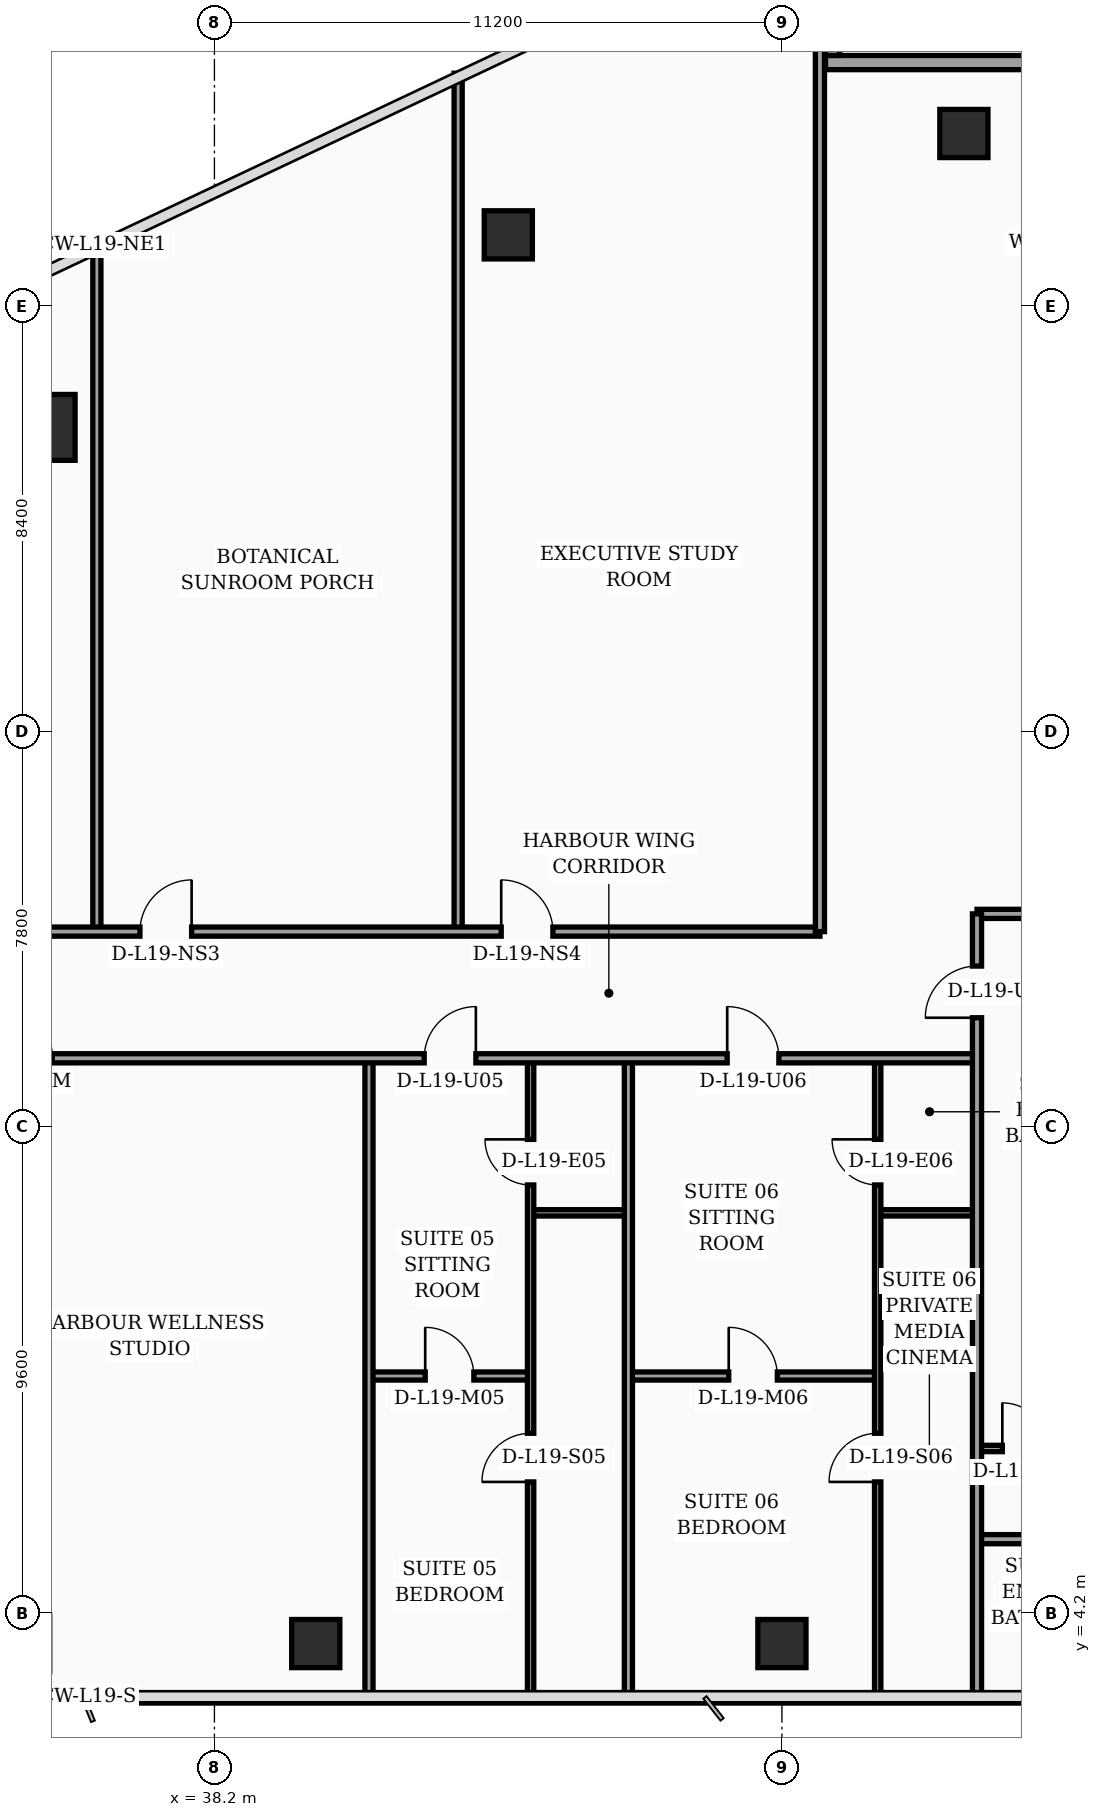
"""IFC4 building model, lengths in metres.
Left out: names, types, materials, properties, quantities, classifications, styles, units other than length and angle.
Written with IfcOpenShell. Run it as: python <this file> out.ifc"""

import sys

from ifc_helpers import new_model, si_unit, direction, frame, frame_2d, origin, origin_2d, place, context, subcontext, project, spatial, rectangle, hollow_rectangle, circle, extrude, element, fill, save


model = new_model("IFC4")
c1 = context("Model", 3, precision=1e-05, world=origin(), true_north=direction((0.0, 1.0)))
c2 = subcontext(c1, "Body", "Model", "MODEL_VIEW")
j1 = project(units=[si_unit("LENGTHUNIT", "METRE"), si_unit("PLANEANGLEUNIT", "RADIAN")], contexts=[c1])
p1 = place(None, origin())
s1 = spatial("IfcSite", under=j1, at=p1, CompositionType="ELEMENT")
p2 = place(p1, origin())
s2 = spatial("IfcBuilding", under=s1, at=p2, CompositionType="ELEMENT")
p3 = place(p2, frame((0.0, 0.0, 81.2)))
s3 = spatial("IfcBuildingStorey", under=s2, at=p3, CompositionType="ELEMENT", Elevation=81.2)
for number, where, z_axis, x_axis in (
    (1, (40.2, 3.6, 0.0), (0.0, 0.0, 1.0), (1.0, 0.0, 0.0)),
    (2, (49.4, 3.6, 0.0), (0.0, 0.0, 1.0), (1.0, 0.0, 0.0)),
):
    element("IfcColumn", number, at=place(p3, frame(where, z_axis=z_axis, x_axis=x_axis)), inside=s3, PredefinedType="COLUMN", context=c2, shape_type="SweptSolid", body=[
        extrude(hollow_rectangle(XDim=0.95, YDim=0.95, WallThickness=0.04, at=origin_2d()), origin(), (0.0, 0.0, 1.0), 3.56),
    ])
p4 = place(p3, frame((34.8, 27.6, 0.0), z_axis=(0.0, 0.0, 1.0), x_axis=(1.0, 0.0, 0.0)))
e3 = element("IfcColumn", 3, at=p4, inside=s3, PredefinedType="COLUMN", context=c2, shape_type="SweptSolid", body=[
    extrude(circle(Radius=0.65, at=origin_2d()), origin(), (0.0, 0.0, 1.0), 3.56),
])
for number, where, z_axis, x_axis in (
    (4, (44.0, 31.4, 0.0), (0.0, 0.0, 1.0), (1.0, 0.0, 0.0)),
    (5, (52.991, 33.4, 0.0), (0.0, 0.0, 1.0), (1.0, 0.0, 0.0)),
):
    element("IfcColumn", number, at=place(p3, frame(where, z_axis=z_axis, x_axis=x_axis)), inside=s3, PredefinedType="COLUMN", context=c2, shape_type="SweptSolid", body=[
        extrude(hollow_rectangle(XDim=0.95, YDim=0.95, WallThickness=0.04, at=origin_2d()), origin(), (0.0, 0.0, 1.0), 3.56),
    ])
p5 = place(p3, frame((54.44, 34.8, 0.0), z_axis=(0.0, 0.0, 1.0), x_axis=(-1.0, 0.0, 0.0)))
e6 = element("IfcWall", 6, at=p5, inside=s3, PredefinedType="SOLIDWALL", context=c2, shape_type="SweptSolid", body=[
    extrude(rectangle(XDim=4.18, YDim=0.28, at=frame_2d((2.09, 0.0))), origin(), (0.0, 0.0, 1.0), 3.56),
])
p6 = place(p3, frame((50.4, 34.94, 0.0), z_axis=(0.0, 0.0, 1.0), x_axis=(0.0, 1.0, 0.0)))
e7 = element("IfcWall", 7, at=p6, inside=s3, PredefinedType="SOLIDWALL", context=c2, shape_type="SweptSolid", body=[
    extrude(rectangle(XDim=3.1, YDim=0.28, at=frame_2d((1.55, 0.0))), origin(), (0.0, 0.0, 1.0), 3.56),
])
p7 = place(p3, frame((44.44, 12.1, 0.0), z_axis=(0.0, 0.0, 1.0), x_axis=(1.0, 0.0, 0.0)))
e8 = element("IfcWall", 8, at=p7, inside=s3, PredefinedType="PARTITIONING", context=c2, shape_type="SweptSolid", body=[
    extrude(rectangle(XDim=1.93, YDim=0.125, at=frame_2d((0.965, 0.0))), origin(), (0.0, 0.0, 1.0), 3.56),
])
p8 = place(p3, frame((41.25, 8.88, 0.0), z_axis=(0.0, 0.0, 1.0), x_axis=(1.0, 0.0, 0.0)))
e9 = element("IfcWall", 9, at=p8, inside=s3, PredefinedType="PARTITIONING", context=c2, shape_type="SweptSolid", body=[
    extrude(rectangle(XDim=3.19, YDim=0.16, at=frame_2d((1.595, 0.0))), origin(), (0.0, 0.0, 1.0), 3.56),
])
p9 = place(p8, frame((1.11, 0.0, 0.0)))
e10 = element("IfcOpeningElement", 10, at=p9, cuts=e9, PredefinedType="OPENING", context=c2, shape_type="SweptSolid", body=[
    extrude(rectangle(XDim=0.96, YDim=2.2, at=frame_2d((0.48, 1.1))), frame((0.0, 0.09, 0.0), z_axis=(0.0, -1.0, 0.0), x_axis=(1.0, 0.0, 0.0)), (0.0, 0.0, 1.0), 0.18),
])
p10 = place(p3, frame((44.44, 2.44, 0.0), z_axis=(0.0, 0.0, 1.0), x_axis=(0.0, 1.0, 0.0)))
e11 = element("IfcWall", 11, at=p10, inside=s3, PredefinedType="PARTITIONING", context=c2, shape_type="SweptSolid", body=[
    extrude(rectangle(XDim=12.71, YDim=0.125, at=frame_2d((6.355, 0.0))), origin(), (0.0, 0.0, 1.0), 3.04),
])
p11 = place(p10, frame((4.35, 0.0, 0.0)))
e12 = element("IfcOpeningElement", 12, at=p11, cuts=e11, PredefinedType="OPENING", context=c2, shape_type="SweptSolid", body=[
    extrude(rectangle(XDim=0.96, YDim=2.2, at=frame_2d((0.48, 1.1))), frame((0.0, 0.073, 0.0), z_axis=(0.0, -1.0, 0.0), x_axis=(1.0, 0.0, 0.0)), (0.0, 0.0, 1.0), 0.145),
])
p12 = place(p10, frame((10.21, 0.0, 0.0)))
e13 = element("IfcOpeningElement", 13, at=p12, cuts=e11, PredefinedType="OPENING", context=c2, shape_type="SweptSolid", body=[
    extrude(rectangle(XDim=0.9, YDim=2.15, at=frame_2d((0.45, 1.075))), frame((0.0, 0.073, 0.0), z_axis=(0.0, -1.0, 0.0), x_axis=(1.0, 0.0, 0.0)), (0.0, 0.0, 1.0), 0.145),
])
p13 = place(p3, frame((41.25, 2.44, 0.0), z_axis=(0.0, 0.0, 1.0), x_axis=(0.0, 1.0, 0.0)))
e14 = element("IfcWall", 14, at=p13, inside=s3, PredefinedType="PARTITIONING", context=c2, shape_type="SweptSolid", body=[
    extrude(rectangle(XDim=12.71, YDim=0.16, at=frame_2d((6.355, 0.0))), origin(), (0.0, 0.0, 1.0), 3.04),
])
p14 = place(p3, frame((51.29, 12.1, 0.0), z_axis=(0.0, 0.0, 1.0), x_axis=(1.0, 0.0, 0.0)))
e15 = element("IfcWall", 15, at=p14, inside=s3, PredefinedType="PARTITIONING", context=c2, shape_type="SweptSolid", body=[
    extrude(rectangle(XDim=1.96, YDim=0.125, at=frame_2d((0.98, 0.0))), origin(), (0.0, 0.0, 1.0), 3.56),
])
p15 = place(p3, frame((46.37, 8.88, 0.0), z_axis=(0.0, 0.0, 1.0), x_axis=(1.0, 0.0, 0.0)))
e16 = element("IfcWall", 16, at=p15, inside=s3, PredefinedType="PARTITIONING", context=c2, shape_type="SweptSolid", body=[
    extrude(rectangle(XDim=4.92, YDim=0.16, at=frame_2d((2.46, 0.0))), origin(), (0.0, 0.0, 1.0), 2.84),
])
p16 = place(p15, frame((1.98, 0.0, 0.0)))
e17 = element("IfcOpeningElement", 17, at=p16, cuts=e16, PredefinedType="OPENING", context=c2, shape_type="SweptSolid", body=[
    extrude(rectangle(XDim=0.96, YDim=2.2, at=frame_2d((0.48, 1.1))), frame((0.0, 0.09, 0.0), z_axis=(0.0, -1.0, 0.0), x_axis=(1.0, 0.0, 0.0)), (0.0, 0.0, 1.0), 0.18),
])
p17 = place(p3, frame((51.29, 2.44, 0.0), z_axis=(0.0, 0.0, 1.0), x_axis=(0.0, 1.0, 0.0)))
e18 = element("IfcWall", 18, at=p17, inside=s3, PredefinedType="PARTITIONING", context=c2, shape_type="SweptSolid", body=[
    extrude(rectangle(XDim=12.71, YDim=0.125, at=frame_2d((6.355, 0.0))), origin(), (0.0, 0.0, 1.0), 3.04),
])
p18 = place(p17, frame((4.35, 0.0, 0.0)))
e19 = element("IfcOpeningElement", 19, at=p18, cuts=e18, PredefinedType="OPENING", context=c2, shape_type="SweptSolid", body=[
    extrude(rectangle(XDim=0.96, YDim=2.2, at=frame_2d((0.48, 1.1))), frame((0.0, 0.073, 0.0), z_axis=(0.0, -1.0, 0.0), x_axis=(1.0, 0.0, 0.0)), (0.0, 0.0, 1.0), 0.145),
])
p19 = place(p17, frame((10.21, 0.0, 0.0)))
e20 = element("IfcOpeningElement", 20, at=p19, cuts=e18, PredefinedType="OPENING", context=c2, shape_type="SweptSolid", body=[
    extrude(rectangle(XDim=0.9, YDim=2.15, at=frame_2d((0.45, 1.075))), frame((0.0, 0.073, 0.0), z_axis=(0.0, -1.0, 0.0), x_axis=(1.0, 0.0, 0.0)), (0.0, 0.0, 1.0), 0.145),
])
p20 = place(p3, frame((46.37, 2.44, 0.0), z_axis=(0.0, 0.0, 1.0), x_axis=(0.0, 1.0, 0.0)))
e21 = element("IfcWall", 21, at=p20, inside=s3, PredefinedType="PARTITIONING", context=c2, shape_type="SweptSolid", body=[
    extrude(rectangle(XDim=12.71, YDim=0.16, at=frame_2d((6.355, 0.0))), origin(), (0.0, 0.0, 1.0), 3.04),
])
p21 = place(p3, frame((32.4, 15.15, 0.0), z_axis=(0.0, 0.0, 1.0), x_axis=(1.0, 0.0, 0.0)))
e22 = element("IfcWall", 22, at=p21, inside=s3, PredefinedType="PARTITIONING", context=c2, shape_type="SweptSolid", body=[
    extrude(rectangle(XDim=20.85, YDim=0.18, at=frame_2d((10.425, 0.0))), origin(), (0.0, 0.0, 1.0), 2.84),
])
p22 = place(p21, frame((1.1, 0.0, 0.0)))
e23 = element("IfcOpeningElement", 23, at=p22, cuts=e22, PredefinedType="OPENING", context=c2, shape_type="SweptSolid", body=[
    extrude(rectangle(XDim=1.5, YDim=2.22, at=frame_2d((0.75, 1.11))), frame((0.0, 0.1, 0.0), z_axis=(0.0, -1.0, 0.0), x_axis=(1.0, 0.0, 0.0)), (0.0, 0.0, 1.0), 0.2),
])
p23 = place(p21, frame((9.94, 0.0, 0.0)))
e24 = element("IfcOpeningElement", 24, at=p23, cuts=e22, PredefinedType="OPENING", context=c2, shape_type="SweptSolid", body=[
    extrude(rectangle(XDim=1.02, YDim=2.2, at=frame_2d((0.51, 1.1))), frame((0.0, 0.1, 0.0), z_axis=(0.0, -1.0, 0.0), x_axis=(1.0, 0.0, 0.0)), (0.0, 0.0, 1.0), 0.2),
])
p24 = place(p21, frame((15.92, 0.0, 0.0)))
e25 = element("IfcOpeningElement", 25, at=p24, cuts=e22, PredefinedType="OPENING", context=c2, shape_type="SweptSolid", body=[
    extrude(rectangle(XDim=1.02, YDim=2.2, at=frame_2d((0.51, 1.1))), frame((0.0, 0.1, 0.0), z_axis=(0.0, -1.0, 0.0), x_axis=(1.0, 0.0, 0.0)), (0.0, 0.0, 1.0), 0.2),
])
p25 = place(p3, frame((35.88, 17.65, 0.0), z_axis=(0.0, 0.0, 1.0), x_axis=(0.0, 1.0, 0.0)))
e26 = element("IfcWall", 26, at=p25, inside=s3, PredefinedType="PARTITIONING", context=c2, shape_type="SweptSolid", body=[
    extrude(rectangle(XDim=13.57, YDim=0.16, at=frame_2d((6.785, 0.0))), origin(), (0.0, 0.0, 1.0), 2.84),
])
p26 = place(p3, frame((43.01, 17.65, 0.0), z_axis=(0.0, 0.0, 1.0), x_axis=(0.0, 1.0, 0.0)))
e27 = element("IfcWall", 27, at=p26, inside=s3, PredefinedType="PARTITIONING", context=c2, shape_type="SweptSolid", body=[
    extrude(rectangle(XDim=16.94, YDim=0.16, at=frame_2d((8.47, 0.0))), origin(), (0.0, 0.0, 1.0), 2.84),
])
p27 = place(p3, frame((21.5, 17.65, 0.0), z_axis=(0.0, 0.0, 1.0), x_axis=(1.0, 0.0, 0.0)))
e28 = element("IfcWall", 28, at=p27, inside=s3, PredefinedType="PARTITIONING", context=c2, shape_type="SweptSolid", body=[
    extrude(rectangle(XDim=28.65, YDim=0.18, at=frame_2d((14.325, 0.0))), origin(), (0.0, 0.0, 1.0), 2.84),
])
p28 = place(p27, frame((0.95, 0.0, 0.0)))
e29 = element("IfcOpeningElement", 29, at=p28, cuts=e28, PredefinedType="OPENING", context=c2, shape_type="SweptSolid", body=[
    extrude(rectangle(XDim=1.02, YDim=2.2, at=frame_2d((0.51, 1.1))), frame((0.0, 0.1, 0.0), z_axis=(0.0, -1.0, 0.0), x_axis=(1.0, 0.0, 0.0)), (0.0, 0.0, 1.0), 0.2),
])
p29 = place(p27, frame((8.74, 0.0, 0.0)))
e30 = element("IfcOpeningElement", 30, at=p29, cuts=e28, PredefinedType="OPENING", context=c2, shape_type="SweptSolid", body=[
    extrude(rectangle(XDim=1.02, YDim=2.2, at=frame_2d((0.51, 1.1))), frame((0.0, 0.1, 0.0), z_axis=(0.0, -1.0, 0.0), x_axis=(1.0, 0.0, 0.0)), (0.0, 0.0, 1.0), 0.2),
])
p30 = place(p27, frame((15.23, 0.0, 0.0)))
e31 = element("IfcOpeningElement", 31, at=p30, cuts=e28, PredefinedType="OPENING", context=c2, shape_type="SweptSolid", body=[
    extrude(rectangle(XDim=1.02, YDim=2.2, at=frame_2d((0.51, 1.1))), frame((0.0, 0.1, 0.0), z_axis=(0.0, -1.0, 0.0), x_axis=(1.0, 0.0, 0.0)), (0.0, 0.0, 1.0), 0.2),
])
p31 = place(p27, frame((22.36, 0.0, 0.0)))
e32 = element("IfcOpeningElement", 32, at=p31, cuts=e28, PredefinedType="OPENING", context=c2, shape_type="SweptSolid", body=[
    extrude(rectangle(XDim=1.02, YDim=2.2, at=frame_2d((0.51, 1.1))), frame((0.0, 0.1, 0.0), z_axis=(0.0, -1.0, 0.0), x_axis=(1.0, 0.0, 0.0)), (0.0, 0.0, 1.0), 0.2),
])
p32 = place(p3, frame((50.15, 17.65, 0.0), z_axis=(0.0, 0.0, 1.0), x_axis=(0.0, 1.0, 0.0)))
e33 = element("IfcWall", 33, at=p32, inside=s3, PredefinedType="PARTITIONING", context=c2, shape_type="SweptSolid", body=[
    extrude(rectangle(XDim=20.31, YDim=0.18, at=frame_2d((10.155, 0.0))), origin(), (0.0, 0.0, 1.0), 2.84),
])
p33 = place(p3, frame((53.25, 7.45, 0.0), z_axis=(0.0, 0.0, 1.0), x_axis=(1.0, 0.0, 0.0)))
e34 = element("IfcWall", 34, at=p33, inside=s3, PredefinedType="PARTITIONING", context=c2, shape_type="SweptSolid", body=[
    extrude(rectangle(XDim=9.71, YDim=0.125, at=frame_2d((4.855, 0.0))), origin(), (0.0, 0.0, 1.0), 3.04),
])
p34 = place(p33, frame((0.5, 0.0, 0.0)))
e35 = element("IfcOpeningElement", 35, at=p34, cuts=e34, PredefinedType="OPENING", context=c2, shape_type="SweptSolid", body=[
    extrude(rectangle(XDim=0.9, YDim=2.15, at=frame_2d((0.45, 1.075))), frame((0.0, 0.073, 0.0), z_axis=(0.0, -1.0, 0.0), x_axis=(1.0, 0.0, 0.0)), (0.0, 0.0, 1.0), 0.145),
])
p35 = place(p33, frame((5.04, 0.0, 0.0)))
e36 = element("IfcOpeningElement", 36, at=p35, cuts=e34, PredefinedType="OPENING", context=c2, shape_type="SweptSolid", body=[
    extrude(rectangle(XDim=0.96, YDim=2.2, at=frame_2d((0.48, 1.1))), frame((0.0, 0.073, 0.0), z_axis=(0.0, -1.0, 0.0), x_axis=(1.0, 0.0, 0.0)), (0.0, 0.0, 1.0), 0.145),
])
p36 = place(p3, frame((53.25, 5.66, 0.0), z_axis=(0.0, 0.0, 1.0), x_axis=(1.0, 0.0, 0.0)))
e37 = element("IfcWall", 37, at=p36, inside=s3, PredefinedType="PARTITIONING", context=c2, shape_type="SweptSolid", body=[
    extrude(rectangle(XDim=7.15, YDim=0.18, at=frame_2d((3.575, 0.0))), origin(), (0.0, 0.0, 1.0), 3.04),
])
p37 = place(p3, frame((53.25, 18.0, 0.0), z_axis=(0.0, 0.0, 1.0), x_axis=(1.0, 0.0, 0.0)))
e38 = element("IfcWall", 38, at=p37, inside=s3, PredefinedType="PARTITIONING", context=c2, shape_type="SweptSolid", body=[
    extrude(rectangle(XDim=6.38, YDim=0.18, at=frame_2d((3.19, 0.0))), origin(), (0.0, 0.0, 1.0), 3.04),
])
p38 = place(p3, frame((53.25, 2.44, 0.0), z_axis=(0.0, 0.0, 1.0), x_axis=(0.0, 1.0, 0.0)))
e39 = element("IfcWall", 39, at=p38, inside=s3, PredefinedType="PARTITIONING", context=c2, shape_type="SweptSolid", body=[
    extrude(rectangle(XDim=15.56, YDim=0.18, at=frame_2d((7.78, 0.0))), origin(), (0.0, 0.0, 1.0), 3.04),
])
p39 = place(p38, frame((13.51, 0.0, 0.0)))
e40 = element("IfcOpeningElement", 40, at=p39, cuts=e39, PredefinedType="OPENING", context=c2, shape_type="SweptSolid", body=[
    extrude(rectangle(XDim=1.02, YDim=2.2, at=frame_2d((0.51, 1.1))), frame((0.0, 0.1, 0.0), z_axis=(0.0, -1.0, 0.0), x_axis=(1.0, 0.0, 0.0)), (0.0, 0.0, 1.0), 0.2),
])
p40 = place(p9, origin())
e41 = element("IfcDoor", 41, at=p40, inside=s3, OperationType="SINGLE_SWING_LEFT", PredefinedType="DOOR", context=c2, shape_type="SweptSolid", body=[
    extrude(rectangle(XDim=0.96, YDim=2.2, at=frame_2d((0.48, 1.1))), frame((0.0, 0.025, 0.0), z_axis=(0.0, -1.0, 0.0), x_axis=(1.0, 0.0, 0.0)), (0.0, 0.0, 1.0), 0.05),
])
fill(e10, e41)
p41 = place(p11, origin())
e42 = element("IfcDoor", 42, at=p41, inside=s3, OperationType="SINGLE_SWING_LEFT", PredefinedType="DOOR", context=c2, shape_type="SweptSolid", body=[
    extrude(rectangle(XDim=0.96, YDim=2.2, at=frame_2d((0.48, 1.1))), frame((0.0, 0.025, 0.0), z_axis=(0.0, -1.0, 0.0), x_axis=(1.0, 0.0, 0.0)), (0.0, 0.0, 1.0), 0.05),
])
fill(e12, e42)
p42 = place(p12, origin())
e43 = element("IfcDoor", 43, at=p42, inside=s3, OperationType="SINGLE_SWING_RIGHT", PredefinedType="DOOR", context=c2, shape_type="SweptSolid", body=[
    extrude(rectangle(XDim=0.9, YDim=2.15, at=frame_2d((0.45, 1.075))), frame((0.0, 0.025, 0.0), z_axis=(0.0, -1.0, 0.0), x_axis=(1.0, 0.0, 0.0)), (0.0, 0.0, 1.0), 0.05),
])
fill(e13, e43)
p43 = place(p16, origin())
e44 = element("IfcDoor", 44, at=p43, inside=s3, OperationType="SINGLE_SWING_LEFT", PredefinedType="DOOR", context=c2, shape_type="SweptSolid", body=[
    extrude(rectangle(XDim=0.96, YDim=2.2, at=frame_2d((0.48, 1.1))), frame((0.0, 0.025, 0.0), z_axis=(0.0, -1.0, 0.0), x_axis=(1.0, 0.0, 0.0)), (0.0, 0.0, 1.0), 0.05),
])
fill(e17, e44)
p44 = place(p18, origin())
e45 = element("IfcDoor", 45, at=p44, inside=s3, OperationType="SINGLE_SWING_LEFT", PredefinedType="DOOR", context=c2, shape_type="SweptSolid", body=[
    extrude(rectangle(XDim=0.96, YDim=2.2, at=frame_2d((0.48, 1.1))), frame((0.0, 0.025, 0.0), z_axis=(0.0, -1.0, 0.0), x_axis=(1.0, 0.0, 0.0)), (0.0, 0.0, 1.0), 0.05),
])
fill(e19, e45)
p45 = place(p19, origin())
e46 = element("IfcDoor", 46, at=p45, inside=s3, OperationType="SINGLE_SWING_RIGHT", PredefinedType="DOOR", context=c2, shape_type="SweptSolid", body=[
    extrude(rectangle(XDim=0.9, YDim=2.15, at=frame_2d((0.45, 1.075))), frame((0.0, 0.025, 0.0), z_axis=(0.0, -1.0, 0.0), x_axis=(1.0, 0.0, 0.0)), (0.0, 0.0, 1.0), 0.05),
])
fill(e20, e46)
p46 = place(p23, origin())
e47 = element("IfcDoor", 47, at=p46, inside=s3, OperationType="SINGLE_SWING_RIGHT", PredefinedType="DOOR", context=c2, shape_type="SweptSolid", body=[
    extrude(rectangle(XDim=1.02, YDim=2.2, at=frame_2d((0.51, 1.1))), frame((0.0, 0.025, 0.0), z_axis=(0.0, -1.0, 0.0), x_axis=(1.0, 0.0, 0.0)), (0.0, 0.0, 1.0), 0.05),
])
fill(e24, e47)
p47 = place(p24, origin())
e48 = element("IfcDoor", 48, at=p47, inside=s3, OperationType="SINGLE_SWING_LEFT", PredefinedType="DOOR", context=c2, shape_type="SweptSolid", body=[
    extrude(rectangle(XDim=1.02, YDim=2.2, at=frame_2d((0.51, 1.1))), frame((0.0, 0.025, 0.0), z_axis=(0.0, -1.0, 0.0), x_axis=(1.0, 0.0, 0.0)), (0.0, 0.0, 1.0), 0.05),
])
fill(e25, e48)
p48 = place(p30, origin())
e49 = element("IfcDoor", 49, at=p48, inside=s3, OperationType="SINGLE_SWING_RIGHT", PredefinedType="DOOR", context=c2, shape_type="SweptSolid", body=[
    extrude(rectangle(XDim=1.02, YDim=2.2, at=frame_2d((0.51, 1.1))), frame((0.0, 0.025, 0.0), z_axis=(0.0, -1.0, 0.0), x_axis=(1.0, 0.0, 0.0)), (0.0, 0.0, 1.0), 0.05),
])
fill(e31, e49)
p49 = place(p31, origin())
e50 = element("IfcDoor", 50, at=p49, inside=s3, OperationType="SINGLE_SWING_LEFT", PredefinedType="DOOR", context=c2, shape_type="SweptSolid", body=[
    extrude(rectangle(XDim=1.02, YDim=2.2, at=frame_2d((0.51, 1.1))), frame((0.0, 0.025, 0.0), z_axis=(0.0, -1.0, 0.0), x_axis=(1.0, 0.0, 0.0)), (0.0, 0.0, 1.0), 0.05),
])
fill(e32, e50)
p50 = place(p34, origin())
e51 = element("IfcDoor", 51, at=p50, inside=s3, OperationType="SINGLE_SWING_LEFT", PredefinedType="DOOR", context=c2, shape_type="SweptSolid", body=[
    extrude(rectangle(XDim=0.9, YDim=2.15, at=frame_2d((0.45, 1.075))), frame((0.0, 0.025, 0.0), z_axis=(0.0, -1.0, 0.0), x_axis=(1.0, 0.0, 0.0)), (0.0, 0.0, 1.0), 0.05),
])
fill(e35, e51)
p51 = place(p39, origin())
e52 = element("IfcDoor", 52, at=p51, inside=s3, OperationType="SINGLE_SWING_LEFT", PredefinedType="DOOR", context=c2, shape_type="SweptSolid", body=[
    extrude(rectangle(XDim=1.02, YDim=2.2, at=frame_2d((0.51, 1.1))), frame((0.0, 0.025, 0.0), z_axis=(0.0, -1.0, 0.0), x_axis=(1.0, 0.0, 0.0)), (0.0, 0.0, 1.0), 0.05),
])
fill(e40, e52)
save(model, sys.argv[1])
